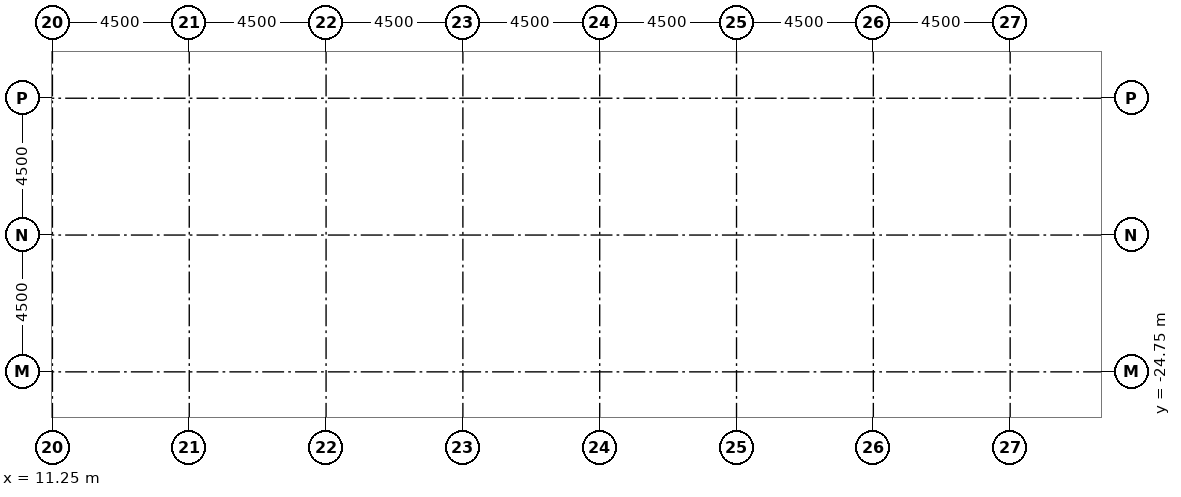
"""IFC4 building model, lengths in metres.
Left out: names, types, materials, properties, quantities, classifications, styles, units other than length and angle.
Written with IfcOpenShell. Run it as: python <this file> out.ifc"""

import sys

from ifc_helpers import new_model, si_unit, direction, frame, origin, origin_2d, place, context, subcontext, project, spatial, rectangle, extrude, element, save


model = new_model("IFC4")
c1 = context("Model", 3, precision=1e-05, world=origin(), true_north=direction((0.0, 1.0)))
c2 = subcontext(c1, "Body", "Model", "MODEL_VIEW")
j1 = project(units=[si_unit("LENGTHUNIT", "METRE"), si_unit("PLANEANGLEUNIT", "RADIAN")], contexts=[c1])
p1 = place(None, origin())
s1 = spatial("IfcSite", under=j1, at=p1, CompositionType="ELEMENT")
p2 = place(p1, origin())
s2 = spatial("IfcBuilding", under=s1, at=p2, CompositionType="ELEMENT")
p3 = place(p2, frame((0.0, 0.0, -4.0)))
s3 = spatial("IfcBuildingStorey", under=s2, at=p3, CompositionType="ELEMENT", Elevation=-4.0)
for number, where, z_axis, x_axis in (
    (1, (22.5, -25.5, 0.0), (0.0, 0.0, 1.0), (1.0, 0.0, 0.0)),
    (2, (31.5, -25.5, 0.0), (0.0, 0.0, 1.0), (1.0, 0.0, 0.0)),
    (3, (40.5, -25.5, 0.0), (0.0, 0.0, 1.0), (1.0, 0.0, 0.0)),
):
    element("IfcColumn", number, at=place(p3, frame(where, z_axis=z_axis, x_axis=x_axis)), inside=s3, PredefinedType="COLUMN", context=c2, shape_type="SweptSolid", body=[
        extrude(rectangle(XDim=1.2, YDim=1.2, at=origin_2d()), origin(), (0.0, 0.0, 1.0), 3.1),
    ])
save(model, sys.argv[1])
